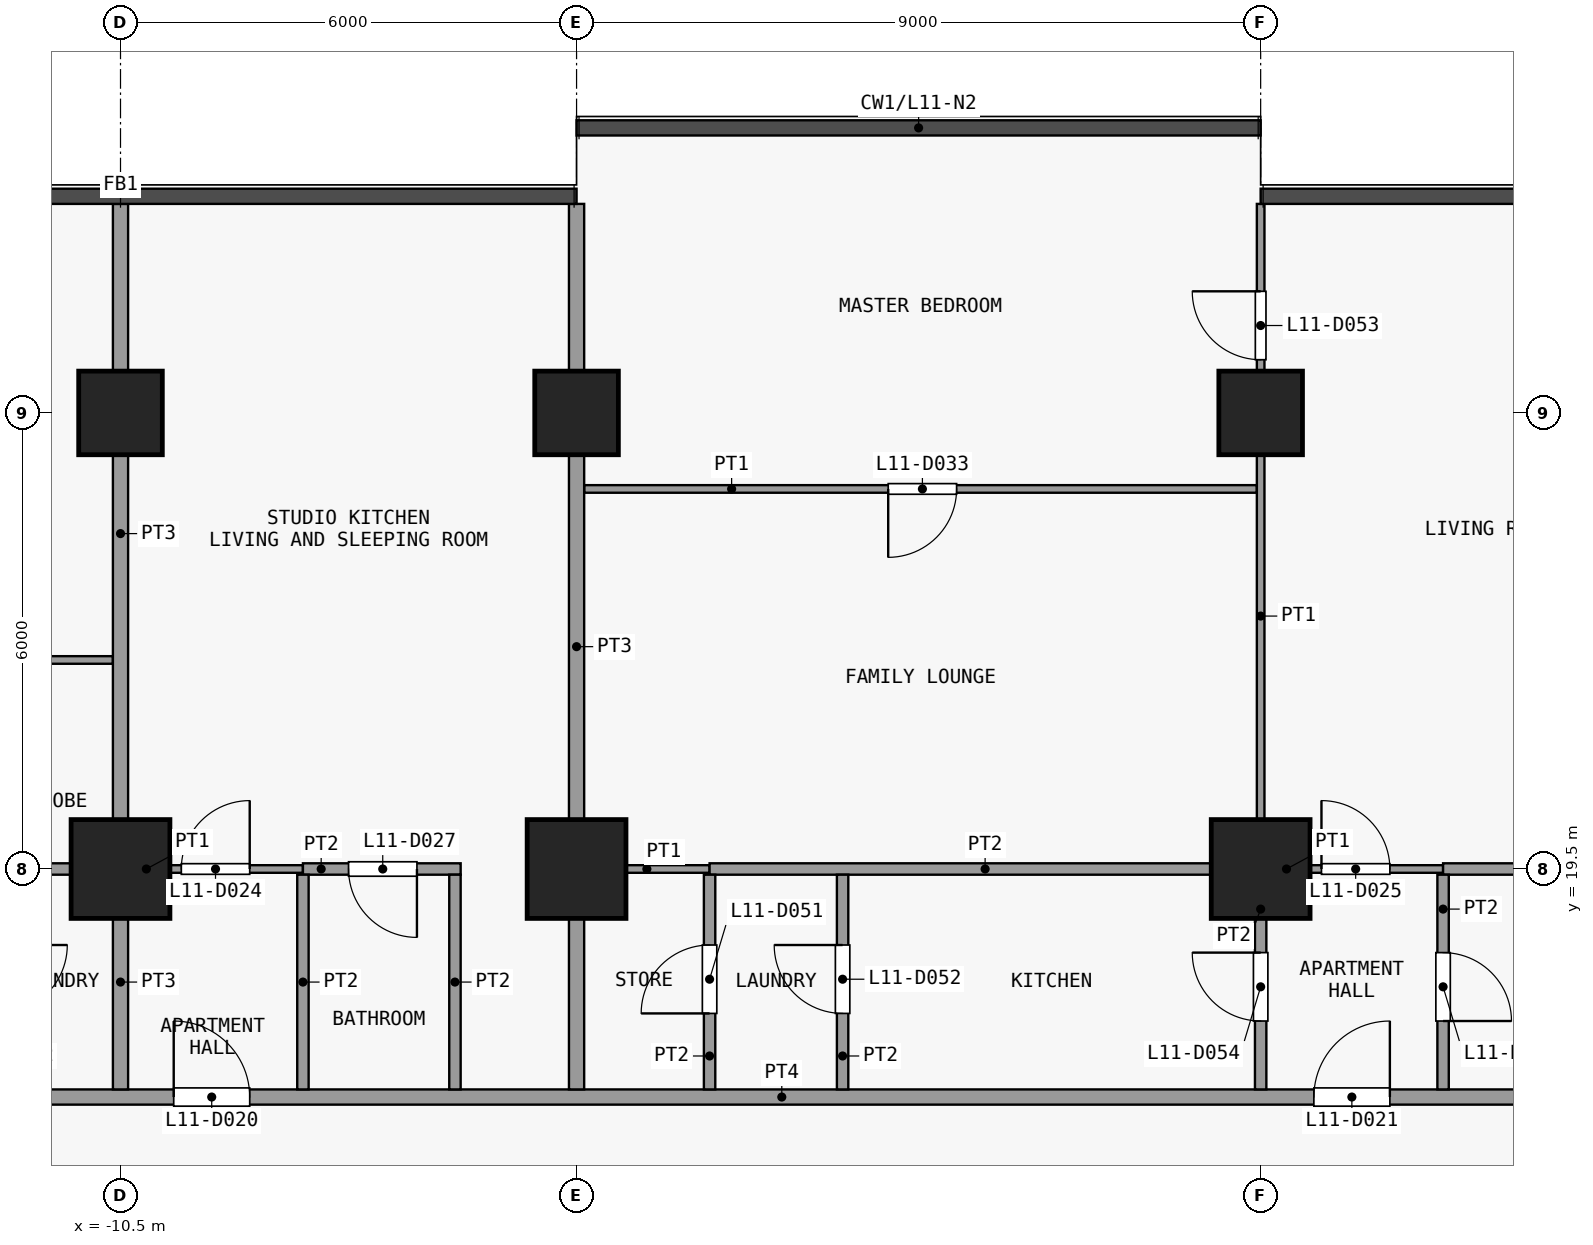
"""IFC4 building model, lengths in metres.
Left out: names, types, materials, properties, quantities, classifications, styles, units other than length and angle.
Written with IfcOpenShell. Run it as: python <this file> out.ifc"""

import sys

from ifc_helpers import new_model, si_unit, direction, frame, frame_2d, origin, origin_2d, place, context, subcontext, project, spatial, rectangle, extrude, element, fill, save


model = new_model("IFC4")
c1 = context("Model", 3, precision=1e-05, world=origin(), true_north=direction((0.0, 1.0)))
c2 = subcontext(c1, "Body", "Model", "MODEL_VIEW")
j1 = project(units=[si_unit("LENGTHUNIT", "METRE"), si_unit("PLANEANGLEUNIT", "RADIAN")], contexts=[c1])
p1 = place(None, origin())
s1 = spatial("IfcSite", under=j1, at=p1, CompositionType="ELEMENT")
p2 = place(p1, origin())
s2 = spatial("IfcBuilding", under=s1, at=p2, CompositionType="ELEMENT")
p3 = place(p2, frame((0.0, 0.0, 50.5)))
s3 = spatial("IfcBuildingStorey", under=s2, at=p3, CompositionType="ELEMENT", Elevation=50.5)
p4 = place(p3, frame((-10.5, 19.5, 0.0), z_axis=(0.0, 0.0, 1.0), x_axis=(1.0, 0.0, 0.0)))
e1 = element("IfcColumn", 1, at=p4, inside=s3, PredefinedType="COLUMN", context=c2, shape_type="SweptSolid", body=[
    extrude(rectangle(XDim=1.3, YDim=1.3, at=origin_2d()), origin(), (0.0, 0.0, 1.0), 3.6),
])
p5 = place(p3, frame((-10.5, 25.5, 0.0), z_axis=(0.0, 0.0, 1.0), x_axis=(1.0, 0.0, 0.0)))
e2 = element("IfcColumn", 2, at=p5, inside=s3, PredefinedType="COLUMN", context=c2, shape_type="SweptSolid", body=[
    extrude(rectangle(XDim=1.1, YDim=1.1, at=origin_2d()), origin(), (0.0, 0.0, 1.0), 3.6),
])
p6 = place(p3, frame((-4.5, 19.5, 0.0), z_axis=(0.0, 0.0, 1.0), x_axis=(1.0, 0.0, 0.0)))
e3 = element("IfcColumn", 3, at=p6, inside=s3, PredefinedType="COLUMN", context=c2, shape_type="SweptSolid", body=[
    extrude(rectangle(XDim=1.3, YDim=1.3, at=origin_2d()), origin(), (0.0, 0.0, 1.0), 3.6),
])
p7 = place(p3, frame((-4.5, 25.5, 0.0), z_axis=(0.0, 0.0, 1.0), x_axis=(1.0, 0.0, 0.0)))
e4 = element("IfcColumn", 4, at=p7, inside=s3, PredefinedType="COLUMN", context=c2, shape_type="SweptSolid", body=[
    extrude(rectangle(XDim=1.1, YDim=1.1, at=origin_2d()), origin(), (0.0, 0.0, 1.0), 3.6),
])
p8 = place(p3, frame((4.5, 19.5, 0.0), z_axis=(0.0, 0.0, 1.0), x_axis=(1.0, 0.0, 0.0)))
e5 = element("IfcColumn", 5, at=p8, inside=s3, PredefinedType="COLUMN", context=c2, shape_type="SweptSolid", body=[
    extrude(rectangle(XDim=1.3, YDim=1.3, at=origin_2d()), origin(), (0.0, 0.0, 1.0), 3.6),
])
p9 = place(p3, frame((4.5, 25.5, 0.0), z_axis=(0.0, 0.0, 1.0), x_axis=(1.0, 0.0, 0.0)))
e6 = element("IfcColumn", 6, at=p9, inside=s3, PredefinedType="COLUMN", context=c2, shape_type="SweptSolid", body=[
    extrude(rectangle(XDim=1.1, YDim=1.1, at=origin_2d()), origin(), (0.0, 0.0, 1.0), 3.6),
])
p10 = place(p3, frame((-25.35, 16.5, 0.0), z_axis=(0.0, 0.0, 1.0), x_axis=(1.0, 0.0, 0.0)))
e7 = element("IfcWall", 7, at=p10, inside=s3, PredefinedType="PARTITIONING", context=c2, shape_type="SweptSolid", body=[
    extrude(rectangle(XDim=50.7, YDim=0.2, at=frame_2d((25.35, 0.0))), origin(), (0.0, 0.0, 1.0), 3.3),
])
p11 = place(p10, frame((7.05, 0.0, 0.0)))
e8 = element("IfcOpeningElement", 8, at=p11, cuts=e7, PredefinedType="OPENING", context=c2, shape_type="SweptSolid", body=[
    extrude(rectangle(XDim=1.0, YDim=2.1, at=frame_2d((0.5, 1.05))), frame((0.0, 0.11, 0.0), z_axis=(0.0, -1.0, 0.0), x_axis=(1.0, 0.0, 0.0)), (0.0, 0.0, 1.0), 0.22),
])
p12 = place(p10, frame((15.55, 0.0, 0.0)))
e9 = element("IfcOpeningElement", 9, at=p12, cuts=e7, PredefinedType="OPENING", context=c2, shape_type="SweptSolid", body=[
    extrude(rectangle(XDim=1.0, YDim=2.1, at=frame_2d((0.5, 1.05))), frame((0.0, 0.11, 0.0), z_axis=(0.0, -1.0, 0.0), x_axis=(1.0, 0.0, 0.0)), (0.0, 0.0, 1.0), 0.22),
])
p13 = place(p10, frame((30.55, 0.0, 0.0)))
e10 = element("IfcOpeningElement", 10, at=p13, cuts=e7, PredefinedType="OPENING", context=c2, shape_type="SweptSolid", body=[
    extrude(rectangle(XDim=1.0, YDim=2.1, at=frame_2d((0.5, 1.05))), frame((0.0, 0.11, 0.0), z_axis=(0.0, -1.0, 0.0), x_axis=(1.0, 0.0, 0.0)), (0.0, 0.0, 1.0), 0.22),
])
p14 = place(p10, frame((45.05, 0.0, 0.0)))
e11 = element("IfcOpeningElement", 11, at=p14, cuts=e7, PredefinedType="OPENING", context=c2, shape_type="SweptSolid", body=[
    extrude(rectangle(XDim=1.0, YDim=2.1, at=frame_2d((0.5, 1.05))), frame((0.0, 0.11, 0.0), z_axis=(0.0, -1.0, 0.0), x_axis=(1.0, 0.0, 0.0)), (0.0, 0.0, 1.0), 0.22),
])
p15 = place(p3, frame((-10.5, 19.5, 0.0), z_axis=(0.0, 0.0, 1.0), x_axis=(1.0, 0.0, 0.0)))
e12 = element("IfcWall", 12, at=p15, inside=s3, PredefinedType="PARTITIONING", context=c2, shape_type="SweptSolid", body=[
    extrude(rectangle(XDim=2.4, YDim=0.1, at=frame_2d((1.2, 0.0))), origin(), (0.0, 0.0, 1.0), 3.3),
])
p16 = place(p15, frame((0.8, 0.0, 0.0)))
e13 = element("IfcOpeningElement", 13, at=p16, cuts=e12, PredefinedType="OPENING", context=c2, shape_type="SweptSolid", body=[
    extrude(rectangle(XDim=0.9, YDim=2.1, at=frame_2d((0.45, 1.05))), frame((0.0, 0.06, 0.0), z_axis=(0.0, -1.0, 0.0), x_axis=(1.0, 0.0, 0.0)), (0.0, 0.0, 1.0), 0.12),
])
p17 = place(p3, frame((-4.4, 19.5, 0.0), z_axis=(0.0, 0.0, 1.0), x_axis=(1.0, 0.0, 0.0)))
e14 = element("IfcWall", 14, at=p17, inside=s3, PredefinedType="PARTITIONING", context=c2, shape_type="SweptSolid", body=[
    extrude(rectangle(XDim=1.65, YDim=0.1, at=frame_2d((0.825, 0.0))), origin(), (0.0, 0.0, 1.0), 3.3),
])
p18 = place(p3, frame((4.5, 19.5, 0.0), z_axis=(0.0, 0.0, 1.0), x_axis=(1.0, 0.0, 0.0)))
e15 = element("IfcWall", 15, at=p18, inside=s3, PredefinedType="PARTITIONING", context=c2, shape_type="SweptSolid", body=[
    extrude(rectangle(XDim=2.4, YDim=0.1, at=frame_2d((1.2, 0.0))), origin(), (0.0, 0.0, 1.0), 3.3),
])
p19 = place(p18, frame((0.8, 0.0, 0.0)))
e16 = element("IfcOpeningElement", 16, at=p19, cuts=e15, PredefinedType="OPENING", context=c2, shape_type="SweptSolid", body=[
    extrude(rectangle(XDim=0.9, YDim=2.1, at=frame_2d((0.45, 1.05))), frame((0.0, 0.06, 0.0), z_axis=(0.0, -1.0, 0.0), x_axis=(1.0, 0.0, 0.0)), (0.0, 0.0, 1.0), 0.12),
])
p20 = place(p3, frame((-13.6, 19.5, 0.0), z_axis=(0.0, 0.0, 1.0), x_axis=(1.0, 0.0, 0.0)))
e17 = element("IfcWall", 17, at=p20, inside=s3, PredefinedType="PARTITIONING", context=c2, shape_type="SweptSolid", body=[
    extrude(rectangle(XDim=3.1, YDim=0.15, at=frame_2d((1.55, 0.0))), origin(), (0.0, 0.0, 1.0), 3.3),
])
p21 = place(p3, frame((-8.1, 19.5, 0.0), z_axis=(0.0, 0.0, 1.0), x_axis=(1.0, 0.0, 0.0)))
e18 = element("IfcWall", 18, at=p21, inside=s3, PredefinedType="PARTITIONING", context=c2, shape_type="SweptSolid", body=[
    extrude(rectangle(XDim=2.075, YDim=0.15, at=frame_2d((1.038, 0.0))), origin(), (0.0, 0.0, 1.0), 3.3),
])
p22 = place(p21, frame((0.6, 0.0, 0.0)))
e19 = element("IfcOpeningElement", 19, at=p22, cuts=e18, PredefinedType="OPENING", context=c2, shape_type="SweptSolid", body=[
    extrude(rectangle(XDim=0.9, YDim=2.1, at=frame_2d((0.45, 1.05))), frame((0.0, 0.085, 0.0), z_axis=(0.0, -1.0, 0.0), x_axis=(1.0, 0.0, 0.0)), (0.0, 0.0, 1.0), 0.17),
])
p23 = place(p3, frame((-2.75, 19.5, 0.0), z_axis=(0.0, 0.0, 1.0), x_axis=(1.0, 0.0, 0.0)))
e20 = element("IfcWall", 20, at=p23, inside=s3, PredefinedType="PARTITIONING", context=c2, shape_type="SweptSolid", body=[
    extrude(rectangle(XDim=7.25, YDim=0.15, at=frame_2d((3.625, 0.0))), origin(), (0.0, 0.0, 1.0), 3.3),
])
p24 = place(p3, frame((6.9, 19.5, 0.0), z_axis=(0.0, 0.0, 1.0), x_axis=(1.0, 0.0, 0.0)))
e21 = element("IfcWall", 21, at=p24, inside=s3, PredefinedType="PARTITIONING", context=c2, shape_type="SweptSolid", body=[
    extrude(rectangle(XDim=6.9, YDim=0.15, at=frame_2d((3.45, 0.0))), origin(), (0.0, 0.0, 1.0), 3.3),
])
p25 = place(p3, frame((-13.8, 22.25, 0.0), z_axis=(0.0, 0.0, 1.0), x_axis=(1.0, 0.0, 0.0)))
e22 = element("IfcWall", 22, at=p25, inside=s3, PredefinedType="PARTITIONING", context=c2, shape_type="SweptSolid", body=[
    extrude(rectangle(XDim=3.2, YDim=0.1, at=frame_2d((1.6, 0.0))), origin(), (0.0, 0.0, 1.0), 3.3),
])
p26 = place(p25, frame((1.2, 0.0, 0.0)))
e23 = element("IfcOpeningElement", 23, at=p26, cuts=e22, PredefinedType="OPENING", context=c2, shape_type="SweptSolid", body=[
    extrude(rectangle(XDim=0.9, YDim=2.1, at=frame_2d((0.45, 1.05))), frame((0.0, 0.06, 0.0), z_axis=(0.0, -1.0, 0.0), x_axis=(1.0, 0.0, 0.0)), (0.0, 0.0, 1.0), 0.12),
])
p27 = place(p3, frame((-4.4, 24.5, 0.0), z_axis=(0.0, 0.0, 1.0), x_axis=(1.0, 0.0, 0.0)))
e24 = element("IfcWall", 24, at=p27, inside=s3, PredefinedType="PARTITIONING", context=c2, shape_type="SweptSolid", body=[
    extrude(rectangle(XDim=8.85, YDim=0.1, at=frame_2d((4.425, 0.0))), origin(), (0.0, 0.0, 1.0), 3.3),
])
p28 = place(p27, frame((4.0, 0.0, 0.0)))
e25 = element("IfcOpeningElement", 25, at=p28, cuts=e24, PredefinedType="OPENING", context=c2, shape_type="SweptSolid", body=[
    extrude(rectangle(XDim=0.9, YDim=2.1, at=frame_2d((0.45, 1.05))), frame((0.0, 0.06, 0.0), z_axis=(0.0, -1.0, 0.0), x_axis=(1.0, 0.0, 0.0)), (0.0, 0.0, 1.0), 0.12),
])
p29 = place(p3, frame((-10.5, 16.6, 0.0), z_axis=(0.0, 0.0, 1.0), x_axis=(0.0, 1.0, 0.0)))
e26 = element("IfcWall", 26, at=p29, inside=s3, PredefinedType="PARTITIONING", context=c2, shape_type="SweptSolid", body=[
    extrude(rectangle(XDim=2.825, YDim=0.2, at=frame_2d((1.413, 0.0))), origin(), (0.0, 0.0, 1.0), 3.3),
])
p30 = place(p3, frame((-10.5, 19.575, 0.0), z_axis=(0.0, 0.0, 1.0), x_axis=(0.0, 1.0, 0.0)))
e27 = element("IfcWall", 27, at=p30, inside=s3, PredefinedType="PARTITIONING", context=c2, shape_type="SweptSolid", body=[
    extrude(rectangle(XDim=8.675, YDim=0.2, at=frame_2d((4.337, 0.0))), origin(), (0.0, 0.0, 1.0), 3.3),
])
for number, where, z_axis, x_axis in (
    (28, (-8.1, 16.6, 0.0), (0.0, 0.0, 1.0), (0.0, 1.0, 0.0)),
    (29, (-6.1, 16.6, 0.0), (0.0, 0.0, 1.0), (0.0, 1.0, 0.0)),
):
    element("IfcWall", number, at=place(p3, frame(where, z_axis=z_axis, x_axis=x_axis)), inside=s3, PredefinedType="PARTITIONING", context=c2, shape_type="SweptSolid", body=[
        extrude(rectangle(XDim=2.825, YDim=0.15, at=frame_2d((1.413, 0.0))), origin(), (0.0, 0.0, 1.0), 3.3),
    ])
p31 = place(p3, frame((-4.5, 16.6, 0.0), z_axis=(0.0, 0.0, 1.0), x_axis=(0.0, 1.0, 0.0)))
e30 = element("IfcWall", 30, at=p31, inside=s3, PredefinedType="PARTITIONING", context=c2, shape_type="SweptSolid", body=[
    extrude(rectangle(XDim=11.65, YDim=0.2, at=frame_2d((5.825, 0.0))), origin(), (0.0, 0.0, 1.0), 3.3),
])
p32 = place(p3, frame((-2.75, 16.6, 0.0), z_axis=(0.0, 0.0, 1.0), x_axis=(0.0, 1.0, 0.0)))
e31 = element("IfcWall", 31, at=p32, inside=s3, PredefinedType="PARTITIONING", context=c2, shape_type="SweptSolid", body=[
    extrude(rectangle(XDim=2.825, YDim=0.15, at=frame_2d((1.413, 0.0))), origin(), (0.0, 0.0, 1.0), 3.3),
])
p33 = place(p32, frame((1.0, 0.0, 0.0)))
e32 = element("IfcOpeningElement", 32, at=p33, cuts=e31, PredefinedType="OPENING", context=c2, shape_type="SweptSolid", body=[
    extrude(rectangle(XDim=0.9, YDim=2.1, at=frame_2d((0.45, 1.05))), frame((0.0, 0.085, 0.0), z_axis=(0.0, -1.0, 0.0), x_axis=(1.0, 0.0, 0.0)), (0.0, 0.0, 1.0), 0.17),
])
p34 = place(p3, frame((-1.0, 16.6, 0.0), z_axis=(0.0, 0.0, 1.0), x_axis=(0.0, 1.0, 0.0)))
e33 = element("IfcWall", 33, at=p34, inside=s3, PredefinedType="PARTITIONING", context=c2, shape_type="SweptSolid", body=[
    extrude(rectangle(XDim=2.825, YDim=0.15, at=frame_2d((1.413, 0.0))), origin(), (0.0, 0.0, 1.0), 3.3),
])
p35 = place(p34, frame((1.0, 0.0, 0.0)))
e34 = element("IfcOpeningElement", 34, at=p35, cuts=e33, PredefinedType="OPENING", context=c2, shape_type="SweptSolid", body=[
    extrude(rectangle(XDim=0.9, YDim=2.1, at=frame_2d((0.45, 1.05))), frame((0.0, 0.085, 0.0), z_axis=(0.0, -1.0, 0.0), x_axis=(1.0, 0.0, 0.0)), (0.0, 0.0, 1.0), 0.17),
])
p36 = place(p3, frame((4.5, 19.575, 0.0), z_axis=(0.0, 0.0, 1.0), x_axis=(0.0, 1.0, 0.0)))
e35 = element("IfcWall", 35, at=p36, inside=s3, PredefinedType="PARTITIONING", context=c2, shape_type="SweptSolid", body=[
    extrude(rectangle(XDim=8.675, YDim=0.1, at=frame_2d((4.337, 0.0))), origin(), (0.0, 0.0, 1.0), 3.3),
])
p37 = place(p36, frame((6.625, 0.0, 0.0)))
e36 = element("IfcOpeningElement", 36, at=p37, cuts=e35, PredefinedType="OPENING", context=c2, shape_type="SweptSolid", body=[
    extrude(rectangle(XDim=0.9, YDim=2.1, at=frame_2d((0.45, 1.05))), frame((0.0, 0.06, 0.0), z_axis=(0.0, -1.0, 0.0), x_axis=(1.0, 0.0, 0.0)), (0.0, 0.0, 1.0), 0.12),
])
p38 = place(p3, frame((4.5, 16.6, 0.0), z_axis=(0.0, 0.0, 1.0), x_axis=(0.0, 1.0, 0.0)))
e37 = element("IfcWall", 37, at=p38, inside=s3, PredefinedType="PARTITIONING", context=c2, shape_type="SweptSolid", body=[
    extrude(rectangle(XDim=2.825, YDim=0.15, at=frame_2d((1.413, 0.0))), origin(), (0.0, 0.0, 1.0), 3.3),
])
p39 = place(p38, frame((0.9, 0.0, 0.0)))
e38 = element("IfcOpeningElement", 38, at=p39, cuts=e37, PredefinedType="OPENING", context=c2, shape_type="SweptSolid", body=[
    extrude(rectangle(XDim=0.9, YDim=2.1, at=frame_2d((0.45, 1.05))), frame((0.0, 0.085, 0.0), z_axis=(0.0, -1.0, 0.0), x_axis=(1.0, 0.0, 0.0)), (0.0, 0.0, 1.0), 0.17),
])
p40 = place(p3, frame((6.9, 16.6, 0.0), z_axis=(0.0, 0.0, 1.0), x_axis=(0.0, 1.0, 0.0)))
e39 = element("IfcWall", 39, at=p40, inside=s3, PredefinedType="PARTITIONING", context=c2, shape_type="SweptSolid", body=[
    extrude(rectangle(XDim=2.825, YDim=0.15, at=frame_2d((1.413, 0.0))), origin(), (0.0, 0.0, 1.0), 3.3),
])
p41 = place(p40, frame((0.9, 0.0, 0.0)))
e40 = element("IfcOpeningElement", 40, at=p41, cuts=e39, PredefinedType="OPENING", context=c2, shape_type="SweptSolid", body=[
    extrude(rectangle(XDim=0.9, YDim=2.1, at=frame_2d((0.45, 1.05))), frame((0.0, 0.085, 0.0), z_axis=(0.0, -1.0, 0.0), x_axis=(1.0, 0.0, 0.0)), (0.0, 0.0, 1.0), 0.17),
])
p42 = place(p12, origin())
e41 = element("IfcDoor", 41, at=p42, inside=s3, OperationType="SINGLE_SWING_RIGHT", PredefinedType="DOOR", context=c2, shape_type="SweptSolid", body=[
    extrude(rectangle(XDim=1.0, YDim=2.1, at=frame_2d((0.5, 1.05))), frame((0.0, 0.025, 0.0), z_axis=(0.0, -1.0, 0.0), x_axis=(1.0, 0.0, 0.0)), (0.0, 0.0, 1.0), 0.05),
])
fill(e9, e41)
p43 = place(p13, origin())
e42 = element("IfcDoor", 42, at=p43, inside=s3, OperationType="SINGLE_SWING_LEFT", PredefinedType="DOOR", context=c2, shape_type="SweptSolid", body=[
    extrude(rectangle(XDim=1.0, YDim=2.1, at=frame_2d((0.5, 1.05))), frame((0.0, 0.025, 0.0), z_axis=(0.0, -1.0, 0.0), x_axis=(1.0, 0.0, 0.0)), (0.0, 0.0, 1.0), 0.05),
])
fill(e10, e42)
p44 = place(p16, origin())
e43 = element("IfcDoor", 43, at=p44, inside=s3, OperationType="SINGLE_SWING_LEFT", PredefinedType="DOOR", context=c2, shape_type="SweptSolid", body=[
    extrude(rectangle(XDim=0.9, YDim=2.1, at=frame_2d((0.45, 1.05))), frame((0.0, 0.025, 0.0), z_axis=(0.0, -1.0, 0.0), x_axis=(1.0, 0.0, 0.0)), (0.0, 0.0, 1.0), 0.05),
])
fill(e13, e43)
p45 = place(p19, origin())
e44 = element("IfcDoor", 44, at=p45, inside=s3, OperationType="SINGLE_SWING_RIGHT", PredefinedType="DOOR", context=c2, shape_type="SweptSolid", body=[
    extrude(rectangle(XDim=0.9, YDim=2.1, at=frame_2d((0.45, 1.05))), frame((0.0, 0.025, 0.0), z_axis=(0.0, -1.0, 0.0), x_axis=(1.0, 0.0, 0.0)), (0.0, 0.0, 1.0), 0.05),
])
fill(e16, e44)
p46 = place(p22, origin())
e45 = element("IfcDoor", 45, at=p46, inside=s3, OperationType="SINGLE_SWING_RIGHT", PredefinedType="DOOR", context=c2, shape_type="SweptSolid", body=[
    extrude(rectangle(XDim=0.9, YDim=2.1, at=frame_2d((0.45, 1.05))), frame((0.0, 0.025, 0.0), z_axis=(0.0, -1.0, 0.0), x_axis=(1.0, 0.0, 0.0)), (0.0, 0.0, 1.0), 0.05),
])
fill(e19, e45)
p47 = place(p28, origin())
e46 = element("IfcDoor", 46, at=p47, inside=s3, OperationType="SINGLE_SWING_LEFT", PredefinedType="DOOR", context=c2, shape_type="SweptSolid", body=[
    extrude(rectangle(XDim=0.9, YDim=2.1, at=frame_2d((0.45, 1.05))), frame((0.0, 0.025, 0.0), z_axis=(0.0, -1.0, 0.0), x_axis=(1.0, 0.0, 0.0)), (0.0, 0.0, 1.0), 0.05),
])
fill(e25, e46)
p48 = place(p33, origin())
e47 = element("IfcDoor", 47, at=p48, inside=s3, OperationType="SINGLE_SWING_RIGHT", PredefinedType="DOOR", context=c2, shape_type="SweptSolid", body=[
    extrude(rectangle(XDim=0.9, YDim=2.1, at=frame_2d((0.45, 1.05))), frame((0.0, 0.025, 0.0), z_axis=(0.0, -1.0, 0.0), x_axis=(1.0, 0.0, 0.0)), (0.0, 0.0, 1.0), 0.05),
])
fill(e32, e47)
p49 = place(p35, origin())
e48 = element("IfcDoor", 48, at=p49, inside=s3, OperationType="SINGLE_SWING_LEFT", PredefinedType="DOOR", context=c2, shape_type="SweptSolid", body=[
    extrude(rectangle(XDim=0.9, YDim=2.1, at=frame_2d((0.45, 1.05))), frame((0.0, 0.025, 0.0), z_axis=(0.0, -1.0, 0.0), x_axis=(1.0, 0.0, 0.0)), (0.0, 0.0, 1.0), 0.05),
])
fill(e34, e48)
p50 = place(p37, origin())
e49 = element("IfcDoor", 49, at=p50, inside=s3, OperationType="SINGLE_SWING_LEFT", PredefinedType="DOOR", context=c2, shape_type="SweptSolid", body=[
    extrude(rectangle(XDim=0.9, YDim=2.1, at=frame_2d((0.45, 1.05))), frame((0.0, 0.025, 0.0), z_axis=(0.0, -1.0, 0.0), x_axis=(1.0, 0.0, 0.0)), (0.0, 0.0, 1.0), 0.05),
])
fill(e36, e49)
p51 = place(p39, origin())
e50 = element("IfcDoor", 50, at=p51, inside=s3, OperationType="SINGLE_SWING_LEFT", PredefinedType="DOOR", context=c2, shape_type="SweptSolid", body=[
    extrude(rectangle(XDim=0.9, YDim=2.1, at=frame_2d((0.45, 1.05))), frame((0.0, 0.025, 0.0), z_axis=(0.0, -1.0, 0.0), x_axis=(1.0, 0.0, 0.0)), (0.0, 0.0, 1.0), 0.05),
])
fill(e38, e50)
p52 = place(p41, origin())
e51 = element("IfcDoor", 51, at=p52, inside=s3, OperationType="SINGLE_SWING_LEFT", PredefinedType="DOOR", context=c2, shape_type="SweptSolid", body=[
    extrude(rectangle(XDim=0.9, YDim=2.1, at=frame_2d((0.45, 1.05))), frame((0.0, 0.025, 0.0), z_axis=(0.0, -1.0, 0.0), x_axis=(1.0, 0.0, 0.0)), (0.0, 0.0, 1.0), 0.05),
])
fill(e40, e51)
save(model, sys.argv[1])
